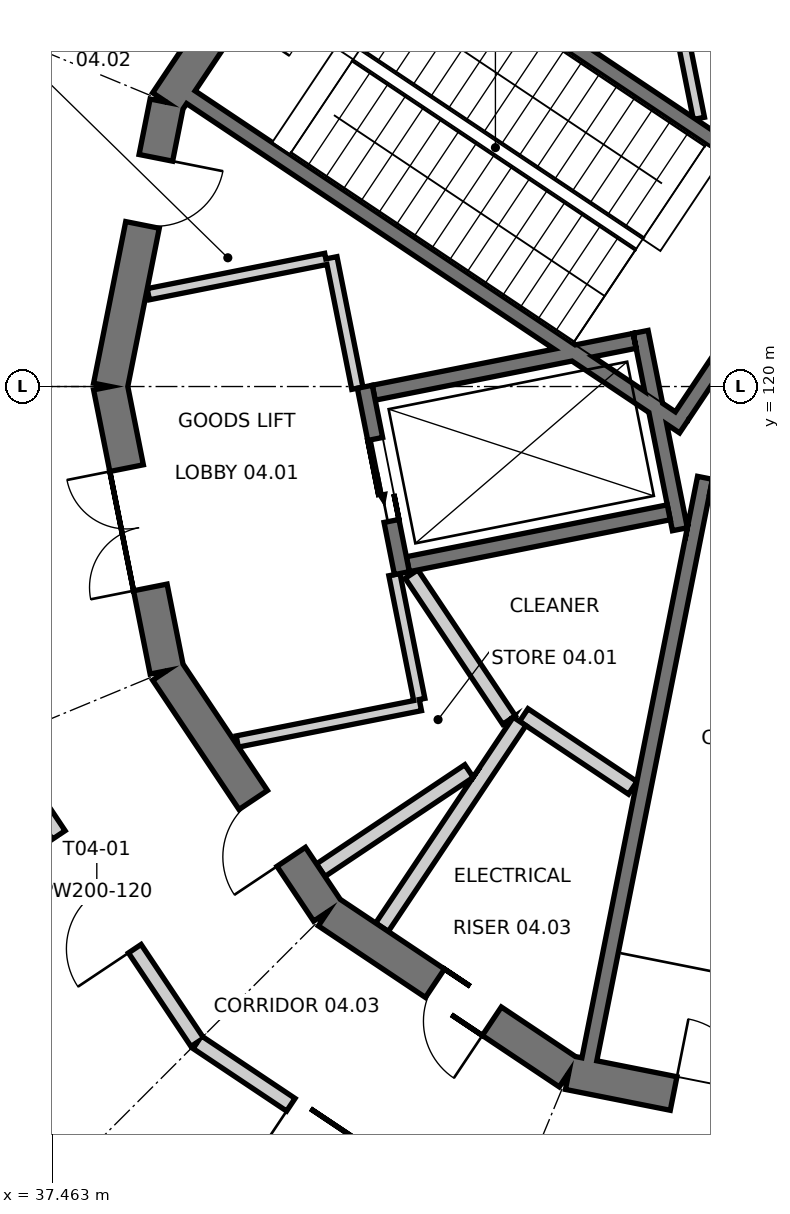
"""IFC4 building model, lengths in metres.
Left out: names, types, materials, properties, quantities, classifications, styles, units other than length and angle.
Written with IfcOpenShell. Run it as: python <this file> out.ifc"""

import sys

from ifc_helpers import new_model, si_unit, direction, frame, frame_2d, origin, place, context, subcontext, project, spatial, polyline, rectangle, outline, extrude, element, fill, save


model = new_model("IFC4")
c1 = context("Model", 3, precision=1e-05, world=origin(), true_north=direction((0.0, 1.0)))
c2 = subcontext(c1, "Body", "Model", "MODEL_VIEW")
j1 = project(units=[si_unit("LENGTHUNIT", "METRE"), si_unit("PLANEANGLEUNIT", "RADIAN")], contexts=[c1])
p1 = place(None, origin())
s1 = spatial("IfcSite", under=j1, at=p1, CompositionType="ELEMENT")
p2 = place(p1, origin())
s2 = spatial("IfcBuilding", under=s1, at=p2, CompositionType="ELEMENT")
p3 = place(p2, frame((0.0, 0.0, 20.4)))
s3 = spatial("IfcBuildingStorey", under=s2, at=p3, CompositionType="ELEMENT", Elevation=20.4)
p4 = place(p3, frame((41.091, 126.909, 0.0), z_axis=(0.0, 0.0, 1.0), x_axis=(-0.555542277102, -0.83148829117, 0.0)))
e1 = element("IfcWall", 1, at=p4, inside=s3, PredefinedType="SHEAR", context=c2, shape_type="SweptSolid", body=[
    extrude(outline(polyline([(-0.045, -0.225), (3.857, -0.225), (3.768, 0.225), (0.045, 0.225), (-0.045, -0.225)])), origin(), (0.0, 0.0, 1.0), 4.52),
])
p5 = place(p4, frame((1.406, 0.0, 0.0)))
e2 = element("IfcOpeningElement", 2, at=p5, cuts=e1, PredefinedType="OPENING", context=c2, shape_type="SweptSolid", body=[
    extrude(rectangle(XDim=1.0, YDim=2.1, at=frame_2d((0.5, 1.05))), frame((0.0, 0.235, 0.0), z_axis=(0.0, -1.0, 0.0), x_axis=(1.0, 0.0, 0.0)), (0.0, 0.0, 1.0), 0.47),
])
p6 = place(p3, frame((38.973, 123.739, 0.0), z_axis=(0.0, 0.0, 1.0), x_axis=(-0.195069197673, -0.98078948206, 0.0)))
e3 = element("IfcWall", 3, at=p6, inside=s3, PredefinedType="SHEAR", context=c2, shape_type="SweptSolid", body=[
    extrude(outline(polyline([(-0.045, -0.225), (3.857, -0.225), (3.768, 0.225), (0.045, 0.225), (-0.045, -0.225)])), origin(), (0.0, 0.0, 1.0), 4.52),
])
p7 = place(p6, frame((0.745, 0.0, 0.0)))
e4 = element("IfcOpeningElement", 4, at=p7, cuts=e3, PredefinedType="OPENING", context=c2, shape_type="SweptSolid", body=[
    extrude(rectangle(XDim=0.9, YDim=2.1, at=frame_2d((0.45, 1.05))), frame((0.0, 0.235, 0.0), z_axis=(0.0, -1.0, 0.0), x_axis=(1.0, 0.0, 0.0)), (0.0, 0.0, 1.0), 0.47),
])
p8 = place(p3, frame((38.229, 120.0, 0.0), z_axis=(0.0, 0.0, 1.0), x_axis=(0.195069197673, -0.98078948206, 0.0)))
e5 = element("IfcWall", 5, at=p8, inside=s3, PredefinedType="SHEAR", context=c2, shape_type="SweptSolid", body=[
    extrude(outline(polyline([(-0.045, -0.225), (3.857, -0.225), (3.768, 0.225), (0.045, 0.225), (-0.045, -0.225)])), origin(), (0.0, 0.0, 1.0), 4.52),
])
p9 = place(p8, frame((1.095, 0.0, 0.0)))
e6 = element("IfcOpeningElement", 6, at=p9, cuts=e5, PredefinedType="OPENING", context=c2, shape_type="SweptSolid", body=[
    extrude(rectangle(XDim=1.6, YDim=2.1, at=frame_2d((0.8, 1.05))), frame((0.0, 0.235, 0.0), z_axis=(0.0, -1.0, 0.0), x_axis=(1.0, 0.0, 0.0)), (0.0, 0.0, 1.0), 0.47),
])
p10 = place(p3, frame((38.973, 116.261, 0.0), z_axis=(0.0, 0.0, 1.0), x_axis=(0.555542277102, -0.83148829117, 0.0)))
e7 = element("IfcWall", 7, at=p10, inside=s3, PredefinedType="SHEAR", context=c2, shape_type="SweptSolid", body=[
    extrude(outline(polyline([(-0.045, -0.225), (3.857, -0.225), (3.768, 0.225), (0.045, 0.225), (-0.045, -0.225)])), origin(), (0.0, 0.0, 1.0), 4.52),
])
p11 = place(p10, frame((2.045, 0.0, 0.0)))
e8 = element("IfcOpeningElement", 8, at=p11, cuts=e7, PredefinedType="OPENING", context=c2, shape_type="SweptSolid", body=[
    extrude(rectangle(XDim=0.9, YDim=2.1, at=frame_2d((0.45, 1.05))), frame((0.0, 0.235, 0.0), z_axis=(0.0, -1.0, 0.0), x_axis=(1.0, 0.0, 0.0)), (0.0, 0.0, 1.0), 0.47),
])
p12 = place(p3, frame((41.091, 113.091, 0.0), z_axis=(0.0, 0.0, 1.0), x_axis=(0.83148829117, -0.555542277102, 0.0)))
e9 = element("IfcWall", 9, at=p12, inside=s3, PredefinedType="SHEAR", context=c2, shape_type="SweptSolid", body=[
    extrude(outline(polyline([(-0.045, -0.225), (3.857, -0.225), (3.768, 0.225), (0.045, 0.225), (-0.045, -0.225)])), origin(), (0.0, 0.0, 1.0), 4.52),
])
p13 = place(p12, frame((1.695, 0.0, 0.0)))
e10 = element("IfcOpeningElement", 10, at=p13, cuts=e9, PredefinedType="OPENING", context=c2, shape_type="SweptSolid", body=[
    extrude(rectangle(XDim=0.9, YDim=2.1, at=frame_2d((0.45, 1.05))), frame((0.0, 0.235, 0.0), z_axis=(0.0, -1.0, 0.0), x_axis=(1.0, 0.0, 0.0)), (0.0, 0.0, 1.0), 0.47),
])
p14 = place(p3, frame((44.261, 110.973, 0.0), z_axis=(0.0, 0.0, 1.0), x_axis=(0.98078948206, -0.195069197673, 0.0)))
e11 = element("IfcWall", 11, at=p14, inside=s3, PredefinedType="SHEAR", context=c2, shape_type="SweptSolid", body=[
    extrude(outline(polyline([(-0.045, -0.225), (3.857, -0.225), (3.768, 0.225), (0.045, 0.225), (-0.045, -0.225)])), origin(), (0.0, 0.0, 1.0), 4.52),
])
p15 = place(p14, frame((1.406, 0.0, 0.0)))
e12 = element("IfcOpeningElement", 12, at=p15, cuts=e11, PredefinedType="OPENING", context=c2, shape_type="SweptSolid", body=[
    extrude(rectangle(XDim=1.0, YDim=2.1, at=frame_2d((0.5, 1.05))), frame((0.0, 0.235, 0.0), z_axis=(0.0, -1.0, 0.0), x_axis=(1.0, 0.0, 0.0)), (0.0, 0.0, 1.0), 0.47),
])
p16 = place(p3, frame((45.774, 119.473, 0.0), z_axis=(0.0, 0.0, 1.0), x_axis=(-0.831486463828, 0.555545012102, 0.0)))
e13 = element("IfcWall", 13, at=p16, inside=s3, PredefinedType="SHEAR", context=c2, shape_type="SweptSolid", body=[
    extrude(rectangle(XDim=7.8, YDim=0.2, at=frame_2d((3.9, 0.0))), origin(), (0.0, 0.0, 1.0), 4.52),
])
p17 = place(p3, frame((47.635, 122.258, 0.0), z_axis=(0.0, 0.0, 1.0), x_axis=(-0.831476803301, 0.555559470779, 0.0)))
e14 = element("IfcWall", 14, at=p17, inside=s3, PredefinedType="SHEAR", context=c2, shape_type="SweptSolid", body=[
    extrude(rectangle(XDim=7.8, YDim=0.2, at=frame_2d((3.9, 0.0))), origin(), (0.0, 0.0, 1.0), 4.52),
])
p18 = place(p3, frame((47.497, 122.231, 0.0), z_axis=(0.0, 0.0, 1.0), x_axis=(-0.55555842186, -0.831477504146, 0.0)))
e15 = element("IfcWall", 15, at=p18, inside=s3, PredefinedType="SHEAR", context=c2, shape_type="SweptSolid", body=[
    extrude(rectangle(XDim=3.15, YDim=0.2, at=frame_2d((1.575, 0.0))), origin(), (0.0, 0.0, 1.0), 4.52),
])
p19 = place(p3, frame((46.053, 118.799, 0.0), z_axis=(0.0, 0.0, 1.0), x_axis=(-0.195092759861, -0.980784795483, 0.0)))
e16 = element("IfcWall", 16, at=p19, inside=s3, PredefinedType="SHEAR", context=c2, shape_type="SweptSolid", body=[
    extrude(rectangle(XDim=7.8, YDim=0.2, at=frame_2d((3.9, 0.0))), origin(), (0.0, 0.0, 1.0), 4.52),
])
p20 = place(p3, frame((46.132, 118.681, 0.0), z_axis=(0.0, 0.0, 1.0), x_axis=(0.980785830564, -0.195087556151, 0.0)))
e17 = element("IfcWall", 17, at=p20, inside=s3, PredefinedType="SHEAR", context=c2, shape_type="SweptSolid", body=[
    extrude(rectangle(XDim=3.15, YDim=0.2, at=frame_2d((1.575, 0.0))), origin(), (0.0, 0.0, 1.0), 4.52),
])
p21 = place(p3, frame((41.577, 119.997, 0.0), z_axis=(0.0, 0.0, 1.0), x_axis=(0.195120673769, -0.980779242576, 0.0)))
e18 = element("IfcWall", 18, at=p21, inside=s3, PredefinedType="SHEAR", context=c2, shape_type="SweptSolid", body=[
    extrude(rectangle(XDim=2.5, YDim=0.2, at=frame_2d((1.25, 0.0))), origin(), (0.0, 0.0, 1.0), 9.02),
])
p22 = place(p21, frame((0.7, 0.0, 0.0)))
e19 = element("IfcOpeningElement", 19, at=p22, cuts=e18, PredefinedType="OPENING", context=c2, shape_type="SweptSolid", body=[
    extrude(rectangle(XDim=1.1, YDim=2.1, at=frame_2d((0.55, 1.05))), frame((0.0, 0.11, 0.0), z_axis=(0.0, -1.0, 0.0), x_axis=(1.0, 0.0, 0.0)), (0.0, 0.0, 1.0), 0.22),
])
p23 = place(p3, frame((45.206, 120.719, 0.0), z_axis=(0.0, 0.0, 1.0), x_axis=(0.195158270522, -0.980771762158, 0.0)))
e20 = element("IfcWall", 20, at=p23, inside=s3, PredefinedType="SHEAR", context=c2, shape_type="SweptSolid", body=[
    extrude(rectangle(XDim=2.647, YDim=0.2, at=frame_2d((1.323, 0.0))), origin(), (0.0, 0.0, 1.0), 9.02),
])
p24 = place(p3, frame((45.576, 118.345, 0.0), z_axis=(0.0, 0.0, 1.0), x_axis=(-0.980781381237, -0.195109923423, 0.0)))
e21 = element("IfcWall", 21, at=p24, inside=s3, PredefinedType="SHEAR", context=c2, shape_type="SweptSolid", body=[
    extrude(rectangle(XDim=3.5, YDim=0.2, at=frame_2d((1.75, 0.0))), origin(), (0.0, 0.0, 1.0), 9.02),
])
p25 = place(p3, frame((45.127, 120.601, 0.0), z_axis=(0.0, 0.0, 1.0), x_axis=(-0.980794727808, -0.195042820694, 0.0)))
e22 = element("IfcWall", 22, at=p25, inside=s3, PredefinedType="SHEAR", context=c2, shape_type="SweptSolid", body=[
    extrude(rectangle(XDim=3.5, YDim=0.2, at=frame_2d((1.75, 0.0))), origin(), (0.0, 0.0, 1.0), 9.02),
])
p26 = place(p3, frame((45.774, 119.473, 4.8), z_axis=(0.0, 0.0, 1.0), x_axis=(-0.831486463828, 0.555545012102, 0.0)))
e23 = element("IfcWall", 23, at=p26, inside=s3, PredefinedType="SOLIDWALL", context=c2, shape_type="SweptSolid", body=[
    extrude(rectangle(XDim=7.8, YDim=0.2, at=frame_2d((3.9, 0.0))), origin(), (0.0, 0.0, 1.0), 2.4),
])
p27 = place(p3, frame((47.635, 122.258, 4.8), z_axis=(0.0, 0.0, 1.0), x_axis=(-0.831476803301, 0.555559470779, 0.0)))
e24 = element("IfcWall", 24, at=p27, inside=s3, PredefinedType="SOLIDWALL", context=c2, shape_type="SweptSolid", body=[
    extrude(rectangle(XDim=7.8, YDim=0.2, at=frame_2d((3.9, 0.0))), origin(), (0.0, 0.0, 1.0), 2.4),
])
p28 = place(p3, frame((47.497, 122.231, 4.8), z_axis=(0.0, 0.0, 1.0), x_axis=(-0.55555842186, -0.831477504146, 0.0)))
e25 = element("IfcWall", 25, at=p28, inside=s3, PredefinedType="SOLIDWALL", context=c2, shape_type="SweptSolid", body=[
    extrude(rectangle(XDim=3.15, YDim=0.2, at=frame_2d((1.575, 0.0))), origin(), (0.0, 0.0, 1.0), 2.4),
])
p29 = place(p3, frame((41.122, 126.73, 4.8), z_axis=(0.0, 0.0, 1.0), x_axis=(-0.555572709421, -0.831467957619, 0.0)))
e26 = element("IfcWall", 26, at=p29, inside=s3, PredefinedType="SOLIDWALL", context=c2, shape_type="SweptSolid", body=[
    extrude(rectangle(XDim=3.55, YDim=0.2, at=frame_2d((1.775, 0.0))), origin(), (0.0, 0.0, 1.0), 2.4),
])
p30 = place(p29, frame((1.275, 0.0, 0.16)))
e27 = element("IfcOpeningElement", 27, at=p30, cuts=e26, PredefinedType="OPENING", context=c2, shape_type="SweptSolid", body=[
    extrude(rectangle(XDim=1.0, YDim=2.1, at=frame_2d((0.5, 1.05))), frame((0.0, 0.11, 0.0), z_axis=(0.0, -1.0, 0.0), x_axis=(1.0, 0.0, 0.0)), (0.0, 0.0, 1.0), 0.22),
])
p31 = place(p3, frame((39.899, 115.33, 0.0), z_axis=(0.0, 0.0, 1.0), x_axis=(0.980782755583, 0.195103014715, 0.0)))
e28 = element("IfcWall", 28, at=p31, inside=s3, PredefinedType="PARTITIONING", context=c2, shape_type="SweptSolid", body=[
    extrude(rectangle(XDim=2.456, YDim=0.15, at=frame_2d((1.228, 0.0))), origin(), (0.0, 0.0, 1.0), 4.52),
])
p32 = place(p3, frame((42.294, 115.883, 0.0), z_axis=(0.0, 0.0, 1.0), x_axis=(-0.195163043227, 0.980770812452, 0.0)))
e29 = element("IfcWall", 29, at=p32, inside=s3, PredefinedType="PARTITIONING", context=c2, shape_type="SweptSolid", body=[
    extrude(rectangle(XDim=1.675, YDim=0.15, at=frame_2d((0.837, 0.0))), origin(), (0.0, 0.0, 1.0), 4.52),
])
p33 = place(p3, frame((41.479, 119.977, 0.0), z_axis=(0.0, 0.0, 1.0), x_axis=(-0.19501613536, 0.98080003413, 0.0)))
e30 = element("IfcWall", 30, at=p33, inside=s3, PredefinedType="PARTITIONING", context=c2, shape_type="SweptSolid", body=[
    extrude(rectangle(XDim=1.75, YDim=0.15, at=frame_2d((0.875, 0.0))), origin(), (0.0, 0.0, 1.0), 4.52),
])
p34 = place(p3, frame((41.064, 121.679, 0.0), z_axis=(0.0, 0.0, 1.0), x_axis=(-0.980781272394, -0.195110470559, 0.0)))
e31 = element("IfcWall", 31, at=p34, inside=s3, PredefinedType="PARTITIONING", context=c2, shape_type="SweptSolid", body=[
    extrude(rectangle(XDim=2.381, YDim=0.15, at=frame_2d((1.19, 0.0))), origin(), (0.0, 0.0, 1.0), 4.52),
])
p35 = place(p3, frame((45.973, 123.528, 0.0), z_axis=(0.0, 0.0, 1.0), x_axis=(-0.195135731435, 0.980776246815, 0.0)))
e32 = element("IfcWall", 32, at=p35, inside=s3, PredefinedType="PARTITIONING", context=c2, shape_type="SweptSolid", body=[
    extrude(rectangle(XDim=2.395, YDim=0.15, at=frame_2d((1.197, 0.0))), origin(), (0.0, 0.0, 1.0), 4.52),
])
p36 = place(p3, frame((43.669, 115.678, 0.0), z_axis=(0.0, 0.0, 1.0), x_axis=(0.831439848025, -0.555614775826, 0.0)))
e33 = element("IfcWall", 33, at=p36, inside=s3, PredefinedType="SOLIDWALL", context=c2, shape_type="SweptSolid", body=[
    extrude(rectangle(XDim=1.724, YDim=0.2, at=frame_2d((0.862, 0.0))), origin(), (0.0, 0.0, 1.0), 4.52),
])
p37 = place(p3, frame((41.803, 112.886, 0.0), z_axis=(0.0, 0.0, 1.0), x_axis=(0.555599142512, 0.83145029487, 0.0)))
e34 = element("IfcWall", 34, at=p37, inside=s3, PredefinedType="SOLIDWALL", context=c2, shape_type="SweptSolid", body=[
    extrude(rectangle(XDim=3.258, YDim=0.2, at=frame_2d((1.629, 0.0))), origin(), (0.0, 0.0, 1.0), 4.52),
])
p38 = place(p3, frame((42.192, 117.532, 0.0), z_axis=(0.0, 0.0, 1.0), x_axis=(0.555553789041, -0.831480599583, 0.0)))
e35 = element("IfcWall", 35, at=p38, inside=s3, PredefinedType="SOLIDWALL", context=c2, shape_type="SweptSolid", body=[
    extrude(rectangle(XDim=2.309, YDim=0.2, at=frame_2d((1.155, 0.0))), origin(), (0.0, 0.0, 1.0), 4.52),
])
p39 = place(p3, frame((42.948, 114.941, 0.0), z_axis=(0.0, 0.0, 1.0), x_axis=(-0.831409634376, -0.555659985842, 0.0)))
e36 = element("IfcWall", 36, at=p39, inside=s3, PredefinedType="SOLIDWALL", context=c2, shape_type="SweptSolid", body=[
    extrude(rectangle(XDim=2.347, YDim=0.2, at=frame_2d((1.174, 0.0))), origin(), (0.0, 0.0, 1.0), 4.52),
])
p40 = place(p3, frame((43.331, 108.729, 0.0), z_axis=(0.0, 0.0, 1.0), x_axis=(-0.831481744248, 0.555552075851, 0.0)))
e37 = element("IfcWall", 37, at=p40, inside=s3, PredefinedType="SOLIDWALL", context=c2, shape_type="SweptSolid", body=[
    extrude(rectangle(XDim=4.76, YDim=0.2, at=frame_2d((2.38, 0.0))), origin(), (0.0, 0.0, 1.0), 4.52),
])
p41 = place(p40, frame((1.48, 0.0, 0.0)))
e38 = element("IfcOpeningElement", 38, at=p41, cuts=e37, PredefinedType="OPENING", context=c2, shape_type="SweptSolid", body=[
    extrude(rectangle(XDim=1.8, YDim=2.1, at=frame_2d((0.9, 1.05))), frame((0.0, 0.11, 0.0), z_axis=(0.0, -1.0, 0.0), x_axis=(1.0, 0.0, 0.0)), (0.0, 0.0, 1.0), 0.22),
])
p42 = place(p3, frame((39.373, 111.373, 0.0), z_axis=(0.0, 0.0, 1.0), x_axis=(-0.555552075851, 0.831481744248, 0.0)))
e39 = element("IfcWall", 39, at=p42, inside=s3, PredefinedType="SOLIDWALL", context=c2, shape_type="SweptSolid", body=[
    extrude(rectangle(XDim=4.76, YDim=0.2, at=frame_2d((2.38, 0.0))), origin(), (0.0, 0.0, 1.0), 4.52),
])
p43 = place(p42, frame((1.48, 0.0, 0.0)))
e40 = element("IfcOpeningElement", 40, at=p43, cuts=e39, PredefinedType="OPENING", context=c2, shape_type="SweptSolid", body=[
    extrude(rectangle(XDim=1.8, YDim=2.1, at=frame_2d((0.9, 1.05))), frame((0.0, 0.11, 0.0), z_axis=(0.0, -1.0, 0.0), x_axis=(1.0, 0.0, 0.0)), (0.0, 0.0, 1.0), 0.22),
])
p44 = place(p15, origin())
e41 = element("IfcDoor", 41, at=p44, inside=s3, OperationType="SINGLE_SWING_LEFT", PredefinedType="DOOR", context=c2, shape_type="SweptSolid", body=[
    extrude(rectangle(XDim=1.0, YDim=2.1, at=frame_2d((0.5, 1.05))), frame((0.0, 0.025, 0.0), z_axis=(0.0, -1.0, 0.0), x_axis=(1.0, 0.0, 0.0)), (0.0, 0.0, 1.0), 0.05),
])
fill(e12, e41)
p45 = place(p22, origin())
e42 = element("IfcDoor", 42, at=p45, inside=s3, OperationType="SLIDING_TO_LEFT", PredefinedType="DOOR", context=c2, shape_type="SweptSolid", body=[
    extrude(rectangle(XDim=1.1, YDim=2.1, at=frame_2d((0.55, 1.05))), frame((0.0, 0.025, 0.0), z_axis=(0.0, -1.0, 0.0), x_axis=(1.0, 0.0, 0.0)), (0.0, 0.0, 1.0), 0.05),
])
fill(e19, e42)
p46 = place(p9, frame((1.6, 0.0, 0.0), z_axis=(0.0, 0.0, 1.0), x_axis=(-1.0, 0.0, 0.0)))
e43 = element("IfcDoor", 43, at=p46, inside=s3, OperationType="DOUBLE_DOOR_SINGLE_SWING", PredefinedType="DOOR", context=c2, shape_type="SweptSolid", body=[
    extrude(rectangle(XDim=1.6, YDim=2.1, at=frame_2d((0.8, 1.05))), frame((0.0, 0.025, 0.0), z_axis=(0.0, -1.0, 0.0), x_axis=(1.0, 0.0, 0.0)), (0.0, 0.0, 1.0), 0.05),
])
fill(e6, e43)
p47 = place(p13, frame((0.9, 0.0, 0.0), z_axis=(0.0, 0.0, 1.0), x_axis=(-1.0, 0.0, 0.0)))
e44 = element("IfcDoor", 44, at=p47, inside=s3, OperationType="SINGLE_SWING_LEFT", PredefinedType="DOOR", context=c2, shape_type="SweptSolid", body=[
    extrude(rectangle(XDim=0.9, YDim=2.1, at=frame_2d((0.45, 1.05))), frame((0.0, 0.025, 0.0), z_axis=(0.0, -1.0, 0.0), x_axis=(1.0, 0.0, 0.0)), (0.0, 0.0, 1.0), 0.05),
])
fill(e10, e44)
p48 = place(p11, frame((0.9, 0.0, 0.0), z_axis=(0.0, 0.0, 1.0), x_axis=(-1.0, 0.0, 0.0)))
e45 = element("IfcDoor", 45, at=p48, inside=s3, OperationType="SINGLE_SWING_LEFT", PredefinedType="DOOR", context=c2, shape_type="SweptSolid", body=[
    extrude(rectangle(XDim=0.9, YDim=2.1, at=frame_2d((0.45, 1.05))), frame((0.0, 0.025, 0.0), z_axis=(0.0, -1.0, 0.0), x_axis=(1.0, 0.0, 0.0)), (0.0, 0.0, 1.0), 0.05),
])
fill(e8, e45)
p49 = place(p7, origin())
e46 = element("IfcDoor", 46, at=p49, inside=s3, OperationType="SINGLE_SWING_LEFT", PredefinedType="DOOR", context=c2, shape_type="SweptSolid", body=[
    extrude(rectangle(XDim=0.9, YDim=2.1, at=frame_2d((0.45, 1.05))), frame((0.0, 0.025, 0.0), z_axis=(0.0, -1.0, 0.0), x_axis=(1.0, 0.0, 0.0)), (0.0, 0.0, 1.0), 0.05),
])
fill(e4, e46)
p50 = place(p43, origin())
e47 = element("IfcDoor", 47, at=p50, inside=s3, OperationType="DOUBLE_DOOR_SINGLE_SWING", PredefinedType="DOOR", context=c2, shape_type="SweptSolid", body=[
    extrude(rectangle(XDim=1.8, YDim=2.1, at=frame_2d((0.9, 1.05))), frame((0.0, 0.025, 0.0), z_axis=(0.0, -1.0, 0.0), x_axis=(1.0, 0.0, 0.0)), (0.0, 0.0, 1.0), 0.05),
])
fill(e40, e47)
p51 = place(p41, origin())
e48 = element("IfcDoor", 48, at=p51, inside=s3, OperationType="DOUBLE_DOOR_SINGLE_SWING", PredefinedType="DOOR", context=c2, shape_type="SweptSolid", body=[
    extrude(rectangle(XDim=1.8, YDim=2.1, at=frame_2d((0.9, 1.05))), frame((0.0, 0.025, 0.0), z_axis=(0.0, -1.0, 0.0), x_axis=(1.0, 0.0, 0.0)), (0.0, 0.0, 1.0), 0.05),
])
fill(e38, e48)
save(model, sys.argv[1])
